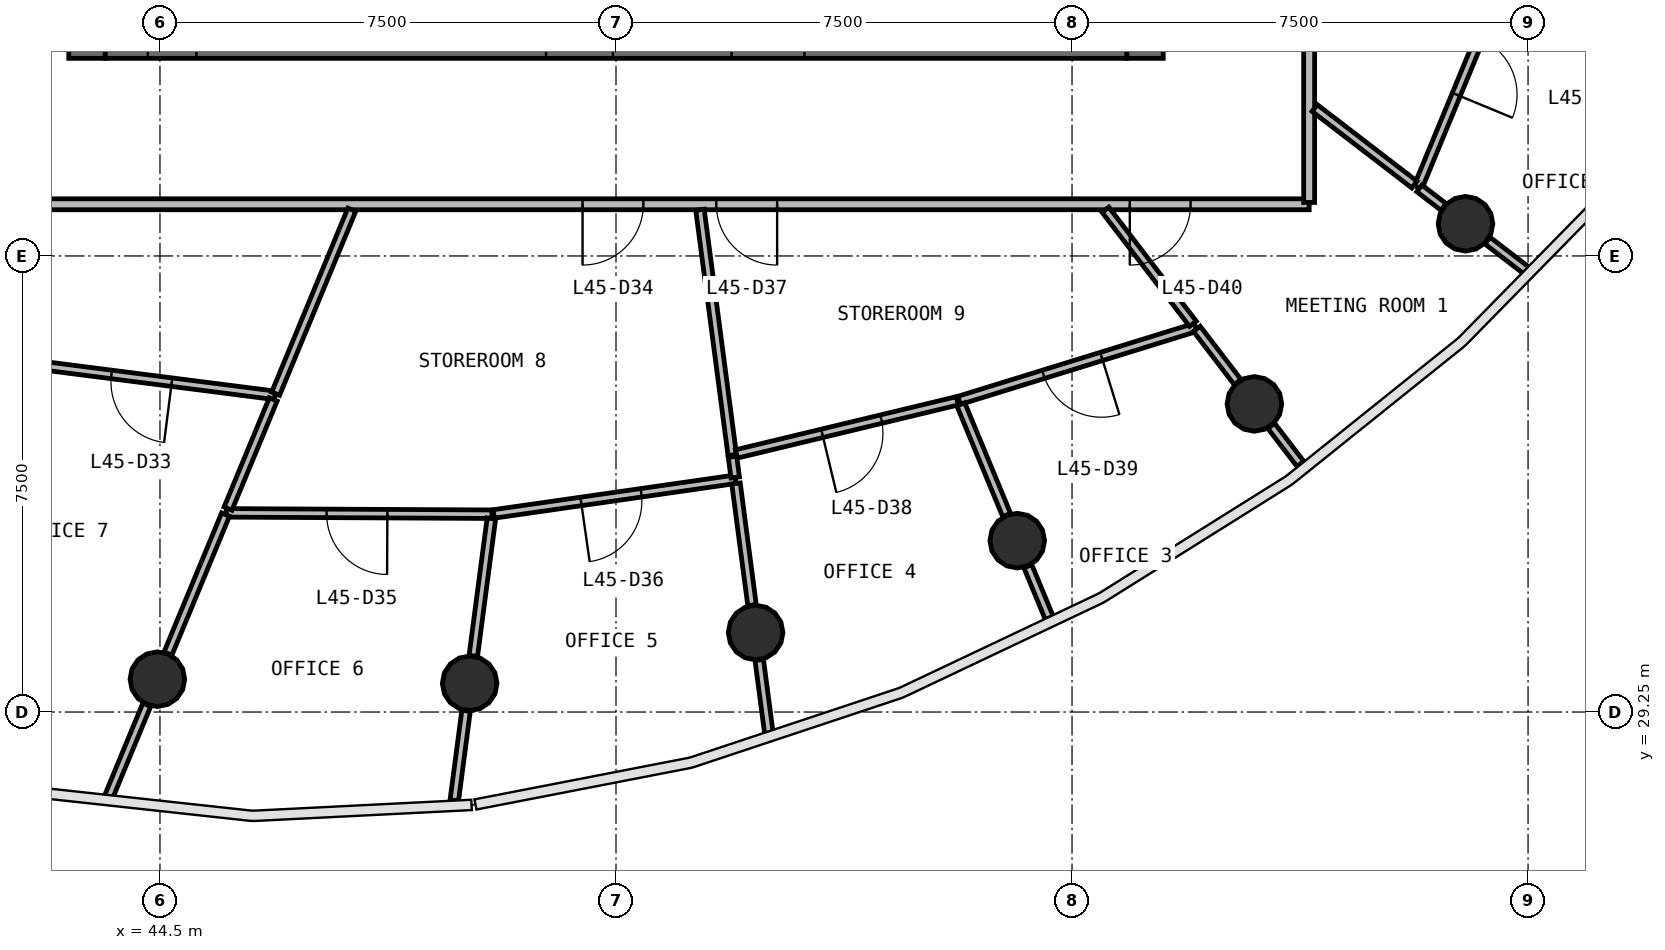
"""IFC4 building model, lengths in metres.
Left out: names, types, materials, properties, quantities, classifications, styles, units other than length and angle.
Written with IfcOpenShell. Run it as: python <this file> out.ifc"""

import sys

from ifc_helpers import new_model, si_unit, direction, frame, frame_2d, origin, origin_2d, place, context, subcontext, project, spatial, rectangle, circle, extrude, source, transform, mapped, element, fill, save


model = new_model("IFC4")
c1 = context("Model", 3, precision=1e-05, world=origin(), true_north=direction((0.0, 1.0)))
c2 = subcontext(c1, "Body", "Model", "MODEL_VIEW")
j1 = project(units=[si_unit("LENGTHUNIT", "METRE"), si_unit("PLANEANGLEUNIT", "RADIAN")], contexts=[c1])
p1 = place(None, origin())
s1 = spatial("IfcSite", under=j1, at=p1, CompositionType="ELEMENT")
p2 = place(p1, origin())
s2 = spatial("IfcBuilding", under=s1, at=p2, CompositionType="ELEMENT")
p3 = place(p2, frame((0.0, 0.0, 187.7)))
s3 = spatial("IfcBuildingStorey", under=s2, at=p3, CompositionType="ELEMENT", Elevation=187.7)
p4 = place(p3, frame((60.7, 40.0, 0.0), z_axis=(0.0, 0.0, 1.0), x_axis=(0.0, 1.0, 0.0)))
e1 = element("IfcWall", 1, at=p4, inside=s3, PredefinedType="SHEAR", context=c2, shape_type="SweptSolid", body=[
    extrude(rectangle(XDim=16.0, YDim=0.6, at=frame_2d((8.0, 0.0))), origin(), (0.0, 0.0, 1.0), 3.9),
])
p5 = place(p4, frame((7.1, 0.0, 0.0)))
e2 = element("IfcOpeningElement", 2, at=p5, cuts=e1, PredefinedType="OPENING", context=c2, shape_type="SweptSolid", body=[
    extrude(rectangle(XDim=1.8, YDim=2.1, at=frame_2d((0.9, 1.05))), frame((0.0, 0.31, 0.0), z_axis=(0.0, -1.0, 0.0), x_axis=(1.0, 0.0, 0.0)), (0.0, 0.0, 1.0), 0.62),
])
p6 = place(p3, frame((43.3, 56.0, 0.0), z_axis=(0.0, 0.0, 1.0), x_axis=(0.0, -1.0, 0.0)))
e3 = element("IfcWall", 3, at=p6, inside=s3, PredefinedType="SHEAR", context=c2, shape_type="SweptSolid", body=[
    extrude(rectangle(XDim=16.0, YDim=0.6, at=frame_2d((8.0, 0.0))), origin(), (0.0, 0.0, 1.0), 3.9),
])
p7 = place(p6, frame((7.1, 0.0, 0.0)))
e4 = element("IfcOpeningElement", 4, at=p7, cuts=e3, PredefinedType="OPENING", context=c2, shape_type="SweptSolid", body=[
    extrude(rectangle(XDim=1.8, YDim=2.1, at=frame_2d((0.9, 1.05))), frame((0.0, 0.31, 0.0), z_axis=(0.0, -1.0, 0.0), x_axis=(1.0, 0.0, 0.0)), (0.0, 0.0, 1.0), 0.62),
])
p8 = place(p3, frame((43.6, 40.3, 0.0), z_axis=(0.0, 0.0, 1.0), x_axis=(1.0, 0.0, 0.0)))
e5 = element("IfcWall", 5, at=p8, inside=s3, PredefinedType="SHEAR", context=c2, shape_type="SweptSolid", body=[
    extrude(rectangle(XDim=16.8, YDim=0.6, at=frame_2d((8.4, 0.0))), origin(), (0.0, 0.0, 1.0), 3.9),
])
p9 = place(p8, frame((10.3, 0.0, 0.0)))
e6 = element("IfcOpeningElement", 6, at=p9, cuts=e5, PredefinedType="OPENING", context=c2, shape_type="SweptSolid", body=[
    extrude(rectangle(XDim=1.2, YDim=2.1, at=frame_2d((0.6, 1.05))), frame((0.0, 0.31, 0.0), z_axis=(0.0, -1.0, 0.0), x_axis=(1.0, 0.0, 0.0)), (0.0, 0.0, 1.0), 0.62),
])
p10 = place(p8, frame((7.25, 0.0, 0.0)))
e7 = element("IfcOpeningElement", 7, at=p10, cuts=e5, PredefinedType="OPENING", context=c2, shape_type="SweptSolid", body=[
    extrude(rectangle(XDim=1.1, YDim=2.1, at=frame_2d((0.55, 1.05))), frame((0.0, 0.31, 0.0), z_axis=(0.0, -1.0, 0.0), x_axis=(1.0, 0.0, 0.0)), (0.0, 0.0, 1.0), 0.62),
])
p11 = place(p8, frame((0.7, 0.0, 0.0)))
e8 = element("IfcOpeningElement", 8, at=p11, cuts=e5, PredefinedType="OPENING", context=c2, shape_type="SweptSolid", body=[
    extrude(rectangle(XDim=0.8, YDim=2.1, at=frame_2d((0.4, 1.05))), frame((0.0, 0.31, 0.0), z_axis=(0.0, -1.0, 0.0), x_axis=(1.0, 0.0, 0.0)), (0.0, 0.0, 1.0), 0.62),
])
m1 = source(origin(), c2, "Body", "SweptSolid", [
    extrude(circle(Radius=0.45, at=origin_2d()), origin(), (0.0, 0.0, 1.0), 3.9),
])
for number, where, z_axis, x_axis in (
    (9, (44.457, 29.79, 0.0), (0.0, 0.0, 1.0), (1.0, 0.0, 0.0)),
    (10, (49.594, 29.722, 0.0), (0.0, 0.0, 1.0), (1.0, 0.0, 0.0)),
    (11, (54.296, 30.558, 0.0), (0.0, 0.0, 1.0), (1.0, 0.0, 0.0)),
    (12, (58.599, 32.069, 0.0), (0.0, 0.0, 1.0), (1.0, 0.0, 0.0)),
    (13, (62.499, 34.317, 0.0), (0.0, 0.0, 1.0), (1.0, 0.0, 0.0)),
    (14, (65.971, 37.28, 0.0), (0.0, 0.0, 1.0), (1.0, 0.0, 0.0)),
):
    element("IfcColumn", number, at=place(p3, frame(where, z_axis=z_axis, x_axis=x_axis)), inside=s3, PredefinedType="COLUMN", context=c2, shape_type="MappedRepresentation", body=[
        mapped(m1, transform((0.0, 0.0, 0.0), scale=1.0)),
    ])
p12 = place(p3, frame((63.4, 37.6, 0.0), z_axis=(0.0, 0.0, 1.0), x_axis=(-1.0, 0.0, 0.0)))
e15 = element("IfcWall", 15, at=p12, inside=s3, PredefinedType="PARTITIONING", context=c2, shape_type="SweptSolid", body=[
    extrude(rectangle(XDim=22.8, YDim=0.18, at=frame_2d((11.4, 0.0))), origin(), (0.0, 0.0, 1.0), 2.88),
])
p13 = place(p12, frame((10.95, 0.0, 0.0)))
e16 = element("IfcOpeningElement", 16, at=p13, cuts=e15, PredefinedType="OPENING", context=c2, shape_type="SweptSolid", body=[
    extrude(rectangle(XDim=1.0, YDim=2.1, at=frame_2d((0.5, 1.05))), frame((0.0, 0.1, 0.0), z_axis=(0.0, -1.0, 0.0), x_axis=(1.0, 0.0, 0.0)), (0.0, 0.0, 1.0), 0.2),
])
p14 = place(p12, frame((8.75, 0.0, 0.0)))
e17 = element("IfcOpeningElement", 17, at=p14, cuts=e15, PredefinedType="OPENING", context=c2, shape_type="SweptSolid", body=[
    extrude(rectangle(XDim=1.0, YDim=2.1, at=frame_2d((0.5, 1.05))), frame((0.0, 0.1, 0.0), z_axis=(0.0, -1.0, 0.0), x_axis=(1.0, 0.0, 0.0)), (0.0, 0.0, 1.0), 0.2),
])
p15 = place(p12, frame((1.95, 0.0, 0.0)))
e18 = element("IfcOpeningElement", 18, at=p15, cuts=e15, PredefinedType="OPENING", context=c2, shape_type="SweptSolid", body=[
    extrude(rectangle(XDim=1.0, YDim=2.1, at=frame_2d((0.5, 1.05))), frame((0.0, 0.1, 0.0), z_axis=(0.0, -1.0, 0.0), x_axis=(1.0, 0.0, 0.0)), (0.0, 0.0, 1.0), 0.2),
])
p16 = place(p3, frame((63.4, 58.37, 0.0), z_axis=(0.0, 0.0, 1.0), x_axis=(0.0, -1.0, 0.0)))
e19 = element("IfcWall", 19, at=p16, inside=s3, PredefinedType="PARTITIONING", context=c2, shape_type="SweptSolid", body=[
    extrude(rectangle(XDim=20.74, YDim=0.18, at=frame_2d((10.37, 0.0))), origin(), (0.0, 0.0, 1.0), 2.88),
])
p17 = place(p16, frame((4.29, 0.0, 0.0)))
e20 = element("IfcOpeningElement", 20, at=p17, cuts=e19, PredefinedType="OPENING", context=c2, shape_type="SweptSolid", body=[
    extrude(rectangle(XDim=1.0, YDim=2.1, at=frame_2d((0.5, 1.05))), frame((0.0, 0.1, 0.0), z_axis=(0.0, -1.0, 0.0), x_axis=(1.0, 0.0, 0.0)), (0.0, 0.0, 1.0), 0.2),
])
p18 = place(p16, frame((12.09, 0.0, 0.0)))
e21 = element("IfcOpeningElement", 21, at=p18, cuts=e19, PredefinedType="OPENING", context=c2, shape_type="SweptSolid", body=[
    extrude(rectangle(XDim=1.0, YDim=2.1, at=frame_2d((0.5, 1.05))), frame((0.0, 0.1, 0.0), z_axis=(0.0, -1.0, 0.0), x_axis=(1.0, 0.0, 0.0)), (0.0, 0.0, 1.0), 0.2),
])
p19 = place(p16, frame((9.89, 0.0, 0.0)))
e22 = element("IfcOpeningElement", 22, at=p19, cuts=e19, PredefinedType="OPENING", context=c2, shape_type="SweptSolid", body=[
    extrude(rectangle(XDim=1.0, YDim=2.1, at=frame_2d((0.5, 1.05))), frame((0.0, 0.1, 0.0), z_axis=(0.0, -1.0, 0.0), x_axis=(1.0, 0.0, 0.0)), (0.0, 0.0, 1.0), 0.2),
])
p20 = place(p3, frame((46.39, 34.458, 0.0), z_axis=(0.0, 0.0, 1.0), x_axis=(-0.991909170029, 0.126949590044, 0.0)))
e23 = element("IfcWall", 23, at=p20, inside=s3, PredefinedType="PARTITIONING", context=c2, shape_type="SweptSolid", body=[
    extrude(rectangle(XDim=4.36, YDim=0.14, at=frame_2d((2.18, 0.0))), origin(), (0.0, 0.0, 1.0), 2.88),
])
p21 = place(p20, frame((1.71, 0.0, 0.0)))
e24 = element("IfcOpeningElement", 24, at=p21, cuts=e23, PredefinedType="OPENING", context=c2, shape_type="SweptSolid", body=[
    extrude(rectangle(XDim=1.0, YDim=2.1, at=frame_2d((0.5, 1.05))), frame((0.0, 0.08, 0.0), z_axis=(0.0, -1.0, 0.0), x_axis=(1.0, 0.0, 0.0)), (0.0, 0.0, 1.0), 0.16),
])
p22 = place(p3, frame((49.96, 32.503, 0.0), z_axis=(0.0, 0.0, 1.0), x_axis=(-0.999986789233, 0.005140171226, 0.0)))
e25 = element("IfcWall", 25, at=p22, inside=s3, PredefinedType="PARTITIONING", context=c2, shape_type="SweptSolid", body=[
    extrude(rectangle(XDim=4.37, YDim=0.14, at=frame_2d((2.185, 0.0))), origin(), (0.0, 0.0, 1.0), 2.88),
])
p23 = place(p22, frame((1.72, 0.0, 0.0)))
e26 = element("IfcOpeningElement", 26, at=p23, cuts=e25, PredefinedType="OPENING", context=c2, shape_type="SweptSolid", body=[
    extrude(rectangle(XDim=1.0, YDim=2.1, at=frame_2d((0.5, 1.05))), frame((0.0, 0.08, 0.0), z_axis=(0.0, -1.0, 0.0), x_axis=(1.0, 0.0, 0.0)), (0.0, 0.0, 1.0), 0.16),
])
p24 = place(p3, frame((66.821, 41.829, 0.0), z_axis=(0.0, 0.0, 1.0), x_axis=(-0.38185883611, -0.924220660494, 0.0)))
e27 = element("IfcWall", 27, at=p24, inside=s3, PredefinedType="PARTITIONING", context=c2, shape_type="SweptSolid", body=[
    extrude(rectangle(XDim=4.273, YDim=0.14, at=frame_2d((2.136, 0.0))), origin(), (0.0, 0.0, 1.0), 2.88),
])
p25 = place(p24, frame((1.623, 0.0, 0.0)))
e28 = element("IfcOpeningElement", 28, at=p25, cuts=e27, PredefinedType="OPENING", context=c2, shape_type="SweptSolid", body=[
    extrude(rectangle(XDim=1.0, YDim=2.1, at=frame_2d((0.5, 1.05))), frame((0.0, 0.08, 0.0), z_axis=(0.0, -1.0, 0.0), x_axis=(1.0, 0.0, 0.0)), (0.0, 0.0, 1.0), 0.16),
])
p26 = place(p3, frame((53.381, 37.51, 0.0), z_axis=(0.0, 0.0, 1.0), x_axis=(0.130488670912, -0.991449800425, 0.0)))
e29 = element("IfcWall", 29, at=p26, inside=s3, PredefinedType="PARTITIONING", context=c2, shape_type="SweptSolid", body=[
    extrude(rectangle(XDim=4.067, YDim=0.14, at=frame_2d((2.034, 0.0))), origin(), (0.0, 0.0, 1.0), 2.88),
])
p27 = place(p3, frame((61.533, 35.576, 0.0), z_axis=(0.0, 0.0, 1.0), x_axis=(-0.955550499177, -0.294827480949, 0.0)))
e30 = element("IfcWall", 30, at=p27, inside=s3, PredefinedType="PARTITIONING", context=c2, shape_type="SweptSolid", body=[
    extrude(rectangle(XDim=4.071, YDim=0.14, at=frame_2d((2.035, 0.0))), origin(), (0.0, 0.0, 1.0), 2.88),
])
p28 = place(p27, frame((1.621, 0.0, 0.0)))
e31 = element("IfcOpeningElement", 31, at=p28, cuts=e30, PredefinedType="OPENING", context=c2, shape_type="SweptSolid", body=[
    extrude(rectangle(XDim=1.0, YDim=2.1, at=frame_2d((0.5, 1.05))), frame((0.0, 0.08, 0.0), z_axis=(0.0, -1.0, 0.0), x_axis=(1.0, 0.0, 0.0)), (0.0, 0.0, 1.0), 0.16),
])
p29 = place(p3, frame((53.965, 33.078, 0.0), z_axis=(0.0, 0.0, 1.0), x_axis=(-0.989847101662, -0.142136256215, 0.0)))
e32 = element("IfcWall", 32, at=p29, inside=s3, PredefinedType="PARTITIONING", context=c2, shape_type="SweptSolid", body=[
    extrude(rectangle(XDim=4.016, YDim=0.14, at=frame_2d((2.008, 0.0))), origin(), (0.0, 0.0, 1.0), 2.88),
])
p30 = place(p29, frame((1.566, 0.0, 0.0)))
e33 = element("IfcOpeningElement", 33, at=p30, cuts=e32, PredefinedType="OPENING", context=c2, shape_type="SweptSolid", body=[
    extrude(rectangle(XDim=1.0, YDim=2.1, at=frame_2d((0.5, 1.05))), frame((0.0, 0.08, 0.0), z_axis=(0.0, -1.0, 0.0), x_axis=(1.0, 0.0, 0.0)), (0.0, 0.0, 1.0), 0.16),
])
p31 = place(p3, frame((57.615, 34.368, 0.0), z_axis=(0.0, 0.0, 1.0), x_axis=(-0.97224482682, -0.233965802463, 0.0)))
e34 = element("IfcWall", 34, at=p31, inside=s3, PredefinedType="PARTITIONING", context=c2, shape_type="SweptSolid", body=[
    extrude(rectangle(XDim=3.738, YDim=0.14, at=frame_2d((1.869, 0.0))), origin(), (0.0, 0.0, 1.0), 2.88),
])
p32 = place(p31, frame((1.288, 0.0, 0.0)))
e35 = element("IfcOpeningElement", 35, at=p32, cuts=e34, PredefinedType="OPENING", context=c2, shape_type="SweptSolid", body=[
    extrude(rectangle(XDim=1.0, YDim=2.1, at=frame_2d((0.5, 1.05))), frame((0.0, 0.08, 0.0), z_axis=(0.0, -1.0, 0.0), x_axis=(1.0, 0.0, 0.0)), (0.0, 0.0, 1.0), 0.16),
])
p33 = place(p3, frame((47.655, 37.51, 0.0), z_axis=(0.0, 0.0, 1.0), x_axis=(-0.382613033564, -0.923908689507, 0.0)))
e36 = element("IfcWall", 36, at=p33, inside=s3, PredefinedType="PARTITIONING", context=c2, shape_type="SweptSolid", body=[
    extrude(rectangle(XDim=3.274, YDim=0.14, at=frame_2d((1.637, 0.0))), origin(), (0.0, 0.0, 1.0), 2.88),
])
p34 = place(p3, frame((60.049, 37.51, 0.0), z_axis=(0.0, 0.0, 1.0), x_axis=(0.608756795241, -0.793356895885, 0.0)))
e37 = element("IfcWall", 37, at=p34, inside=s3, PredefinedType="PARTITIONING", context=c2, shape_type="SweptSolid", body=[
    extrude(rectangle(XDim=2.363, YDim=0.14, at=frame_2d((1.182, 0.0))), origin(), (0.0, 0.0, 1.0), 2.88),
])
p35 = place(p3, frame((45.579, 32.498, 0.0), z_axis=(0.0, 0.0, 1.0), x_axis=(-0.38268861501, -0.923877385773, 0.0)))
e38 = element("IfcWall", 38, at=p35, inside=s3, PredefinedType="PARTITIONING", context=c2, shape_type="SweptSolid", body=[
    extrude(rectangle(XDim=2.475, YDim=0.14, at=frame_2d((1.238, 0.0))), origin(), (0.0, 0.0, 1.0), 2.88),
])
p36 = place(p3, frame((49.951, 32.433, 0.0), z_axis=(0.0, 0.0, 1.0), x_axis=(-0.130620685545, -0.991432416511, 0.0)))
e39 = element("IfcWall", 39, at=p36, inside=s3, PredefinedType="PARTITIONING", context=c2, shape_type="SweptSolid", body=[
    extrude(rectangle(XDim=2.28, YDim=0.14, at=frame_2d((1.14, 0.0))), origin(), (0.0, 0.0, 1.0), 2.88),
])
p37 = place(p3, frame((63.49, 39.183, 0.0), z_axis=(0.0, 0.0, 1.0), x_axis=(0.793382212358, -0.608723800351, 0.0)))
e40 = element("IfcWall", 40, at=p37, inside=s3, PredefinedType="PARTITIONING", context=c2, shape_type="SweptSolid", body=[
    extrude(rectangle(XDim=2.069, YDim=0.14, at=frame_2d((1.035, 0.0))), origin(), (0.0, 0.0, 1.0), 2.88),
])
p38 = place(p3, frame((46.363, 34.39, 0.0), z_axis=(0.0, 0.0, 1.0), x_axis=(-0.382714283838, -0.923866752809, 0.0)))
e41 = element("IfcWall", 41, at=p38, inside=s3, PredefinedType="PARTITIONING", context=c2, shape_type="SweptSolid", body=[
    extrude(rectangle(XDim=1.943, YDim=0.14, at=frame_2d((0.972, 0.0))), origin(), (0.0, 0.0, 1.0), 2.88),
])
p39 = place(p3, frame((53.974, 33.008, 0.0), z_axis=(0.0, 0.0, 1.0), x_axis=(0.130570332489, -0.991439049198, 0.0)))
e42 = element("IfcWall", 42, at=p39, inside=s3, PredefinedType="PARTITIONING", context=c2, shape_type="SweptSolid", body=[
    extrude(rectangle(XDim=2.018, YDim=0.14, at=frame_2d((1.009, 0.0))), origin(), (0.0, 0.0, 1.0), 2.88),
])
p40 = place(p3, frame((57.67, 34.31, 0.0), z_axis=(0.0, 0.0, 1.0), x_axis=(0.382679925467, -0.923880985108, 0.0)))
e43 = element("IfcWall", 43, at=p40, inside=s3, PredefinedType="PARTITIONING", context=c2, shape_type="SweptSolid", body=[
    extrude(rectangle(XDim=1.971, YDim=0.14, at=frame_2d((0.986, 0.0))), origin(), (0.0, 0.0, 1.0), 2.88),
])
p41 = place(p3, frame((44.283, 29.37, 0.0), z_axis=(0.0, 0.0, 1.0), x_axis=(-0.382707947272, -0.923869377723, 0.0)))
e44 = element("IfcWall", 44, at=p41, inside=s3, PredefinedType="PARTITIONING", context=c2, shape_type="SweptSolid", body=[
    extrude(rectangle(XDim=1.655, YDim=0.14, at=frame_2d((0.827, 0.0))), origin(), (0.0, 0.0, 1.0), 2.88),
])
p42 = place(p3, frame((49.534, 29.271, 0.0), z_axis=(0.0, 0.0, 1.0), x_axis=(-0.130484270085, -0.991450379626, 0.0)))
e45 = element("IfcWall", 45, at=p42, inside=s3, PredefinedType="PARTITIONING", context=c2, shape_type="SweptSolid", body=[
    extrude(rectangle(XDim=1.486, YDim=0.14, at=frame_2d((0.743, 0.0))), origin(), (0.0, 0.0, 1.0), 2.88),
])
p43 = place(p3, frame((54.356, 30.107, 0.0), z_axis=(0.0, 0.0, 1.0), x_axis=(0.130516938272, -0.991446079635, 0.0)))
e46 = element("IfcWall", 46, at=p43, inside=s3, PredefinedType="PARTITIONING", context=c2, shape_type="SweptSolid", body=[
    extrude(rectangle(XDim=1.214, YDim=0.14, at=frame_2d((0.607, 0.0))), origin(), (0.0, 0.0, 1.0), 2.88),
])
p44 = place(p3, frame((61.552, 35.552, 0.0), z_axis=(0.0, 0.0, 1.0), x_axis=(0.608682619124, -0.793413807024, 0.0)))
e47 = element("IfcWall", 47, at=p44, inside=s3, PredefinedType="PARTITIONING", context=c2, shape_type="SweptSolid", body=[
    extrude(rectangle(XDim=1.102, YDim=0.14, at=frame_2d((0.551, 0.0))), origin(), (0.0, 0.0, 1.0), 2.88),
])
p45 = place(p3, frame((58.773, 31.648, 0.0), z_axis=(0.0, 0.0, 1.0), x_axis=(0.382656259044, -0.923890787601, 0.0)))
e48 = element("IfcWall", 48, at=p45, inside=s3, PredefinedType="PARTITIONING", context=c2, shape_type="SweptSolid", body=[
    extrude(rectangle(XDim=0.921, YDim=0.14, at=frame_2d((0.46, 0.0))), origin(), (0.0, 0.0, 1.0), 2.88),
])
p46 = place(p3, frame((66.332, 37.003, 0.0), z_axis=(0.0, 0.0, 1.0), x_axis=(0.793336246331, -0.608783705644, 0.0)))
e49 = element("IfcWall", 49, at=p46, inside=s3, PredefinedType="PARTITIONING", context=c2, shape_type="SweptSolid", body=[
    extrude(rectangle(XDim=0.815, YDim=0.14, at=frame_2d((0.407, 0.0))), origin(), (0.0, 0.0, 1.0), 2.88),
])
p47 = place(p3, frame((62.776, 33.956, 0.0), z_axis=(0.0, 0.0, 1.0), x_axis=(0.608918355889, -0.793232901399, 0.0)))
e50 = element("IfcWall", 50, at=p47, inside=s3, PredefinedType="PARTITIONING", context=c2, shape_type="SweptSolid", body=[
    extrude(rectangle(XDim=0.79, YDim=0.14, at=frame_2d((0.395, 0.0))), origin(), (0.0, 0.0, 1.0), 2.88),
])
p48 = place(p3, frame((65.213, 37.861, 0.0), z_axis=(0.0, 0.0, 1.0), x_axis=(0.793402374063, -0.608697521624, 0.0)))
e51 = element("IfcWall", 51, at=p48, inside=s3, PredefinedType="PARTITIONING", context=c2, shape_type="SweptSolid", body=[
    extrude(rectangle(XDim=0.501, YDim=0.14, at=frame_2d((0.25, 0.0))), origin(), (0.0, 0.0, 1.0), 2.88),
])
p49 = place(p3, frame((53.916, 33.448, 0.0), z_axis=(0.0, 0.0, 1.0), x_axis=(0.13025198061, -0.991480923441, 0.0)))
e52 = element("IfcWall", 52, at=p49, inside=s3, PredefinedType="PARTITIONING", context=c2, shape_type="SweptSolid", body=[
    extrude(rectangle(XDim=0.343, YDim=0.14, at=frame_2d((0.171, 0.0))), origin(), (0.0, 0.0, 1.0), 2.88),
])
m2 = source(origin(), c2, "Body", "SweptSolid", [
    extrude(rectangle(XDim=1.0, YDim=2.1, at=frame_2d((0.5, 1.05))), frame((0.0, 0.025, 0.0), z_axis=(0.0, -1.0, 0.0), x_axis=(1.0, 0.0, 0.0)), (0.0, 0.0, 1.0), 0.05),
])
p50 = place(p21, origin())
e53 = element("IfcDoor", 53, at=p50, inside=s3, OperationType="SINGLE_SWING_LEFT", PredefinedType="DOOR", context=c2, shape_type="MappedRepresentation", body=[
    mapped(m2, transform((0.0, 0.0, 0.0), scale=1.0)),
])
fill(e24, e53)
p51 = place(p13, origin())
e54 = element("IfcDoor", 54, at=p51, inside=s3, OperationType="SINGLE_SWING_RIGHT", PredefinedType="DOOR", context=c2, shape_type="MappedRepresentation", body=[
    mapped(m2, transform((0.0, 0.0, 0.0), scale=1.0)),
])
fill(e16, e54)
p52 = place(p23, origin())
e55 = element("IfcDoor", 55, at=p52, inside=s3, OperationType="SINGLE_SWING_LEFT", PredefinedType="DOOR", context=c2, shape_type="MappedRepresentation", body=[
    mapped(m2, transform((0.0, 0.0, 0.0), scale=1.0)),
])
fill(e26, e55)
p53 = place(p30, origin())
e56 = element("IfcDoor", 56, at=p53, inside=s3, OperationType="SINGLE_SWING_RIGHT", PredefinedType="DOOR", context=c2, shape_type="MappedRepresentation", body=[
    mapped(m2, transform((0.0, 0.0, 0.0), scale=1.0)),
])
fill(e33, e56)
p54 = place(p14, origin())
e57 = element("IfcDoor", 57, at=p54, inside=s3, OperationType="SINGLE_SWING_LEFT", PredefinedType="DOOR", context=c2, shape_type="MappedRepresentation", body=[
    mapped(m2, transform((0.0, 0.0, 0.0), scale=1.0)),
])
fill(e17, e57)
p55 = place(p32, origin())
e58 = element("IfcDoor", 58, at=p55, inside=s3, OperationType="SINGLE_SWING_RIGHT", PredefinedType="DOOR", context=c2, shape_type="MappedRepresentation", body=[
    mapped(m2, transform((0.0, 0.0, 0.0), scale=1.0)),
])
fill(e35, e58)
p56 = place(p28, origin())
e59 = element("IfcDoor", 59, at=p56, inside=s3, OperationType="SINGLE_SWING_LEFT", PredefinedType="DOOR", context=c2, shape_type="MappedRepresentation", body=[
    mapped(m2, transform((0.0, 0.0, 0.0), scale=1.0)),
])
fill(e31, e59)
p57 = place(p15, origin())
e60 = element("IfcDoor", 60, at=p57, inside=s3, OperationType="SINGLE_SWING_RIGHT", PredefinedType="DOOR", context=c2, shape_type="MappedRepresentation", body=[
    mapped(m2, transform((0.0, 0.0, 0.0), scale=1.0)),
])
fill(e18, e60)
p58 = place(p25, origin())
e61 = element("IfcDoor", 61, at=p58, inside=s3, OperationType="SINGLE_SWING_RIGHT", PredefinedType="DOOR", context=c2, shape_type="MappedRepresentation", body=[
    mapped(m2, transform((0.0, 0.0, 0.0), scale=1.0)),
])
fill(e28, e61)
save(model, sys.argv[1])
